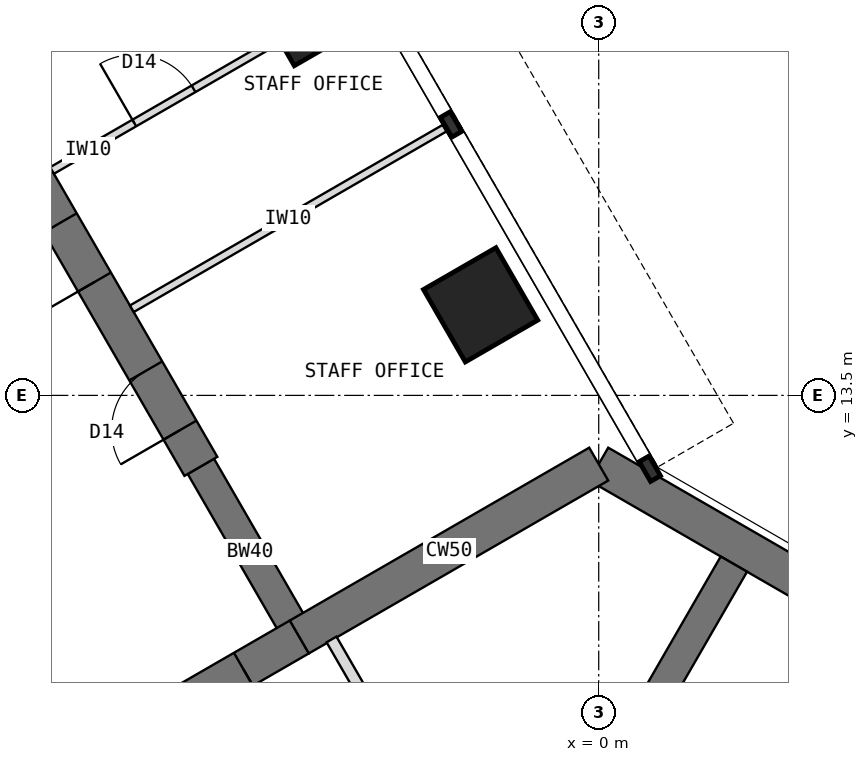
"""IFC4 building model, lengths in metres.
Left out: names, types, materials, properties, quantities, classifications, styles, units other than length and angle.
Written with IfcOpenShell. Run it as: python <this file> out.ifc"""

import sys

from ifc_helpers import new_model, si_unit, direction, frame, frame_2d, origin, origin_2d, place, context, subcontext, project, spatial, rectangle, extrude, element, fill, save


model = new_model("IFC4")
c1 = context("Model", 3, precision=1e-05, world=origin(), true_north=direction((0.0, 1.0)))
c2 = subcontext(c1, "Body", "Model", "MODEL_VIEW")
j1 = project(units=[si_unit("LENGTHUNIT", "METRE"), si_unit("PLANEANGLEUNIT", "RADIAN")], contexts=[c1])
p1 = place(None, origin())
s1 = spatial("IfcSite", under=j1, at=p1, CompositionType="ELEMENT")
p2 = place(p1, origin())
s2 = spatial("IfcBuilding", under=s1, at=p2, CompositionType="ELEMENT")
p3 = place(p2, frame((0.0, 0.0, 234.5)))
s3 = spatial("IfcBuildingStorey", under=s2, at=p3, CompositionType="ELEMENT", Elevation=234.5)
p4 = place(p3, frame((10.908, 6.298, 0.0), z_axis=(0.0, 0.0, 1.0), x_axis=(-0.866021940709, 0.500005998175, 0.0)))
e1 = element("IfcWall", 1, at=p4, inside=s3, PredefinedType="SHEAR", context=c2, shape_type="SweptSolid", body=[
    extrude(rectangle(XDim=12.596, YDim=0.5, at=frame_2d((6.298, 0.0))), origin(), (0.0, 0.0, 1.0), 4.0),
])
p5 = place(p3, frame((0.0, 12.596, 0.0), z_axis=(0.0, 0.0, 1.0), x_axis=(-0.866011268655, -0.500024481964, 0.0)))
e2 = element("IfcWall", 2, at=p5, inside=s3, PredefinedType="SHEAR", context=c2, shape_type="SweptSolid", body=[
    extrude(rectangle(XDim=4.548, YDim=0.5, at=frame_2d((2.274, 0.0))), origin(), (0.0, 0.0, 1.0), 4.0),
])
p6 = place(p3, frame((-3.939, 10.322, 0.0), z_axis=(0.0, 0.0, 1.0), x_axis=(-0.866019471182, -0.500010275428, 0.0)))
e3 = element("IfcWall", 3, at=p6, inside=s3, PredefinedType="SHEAR", context=c2, shape_type="SweptSolid", body=[
    extrude(rectangle(XDim=3.5, YDim=0.5, at=frame_2d((1.75, 0.0))), origin(), (0.0, 0.0, 1.0), 4.0),
])
p7 = place(p6, frame((0.85, 0.0, 0.0)))
e4 = element("IfcOpeningElement", 4, at=p7, cuts=e3, PredefinedType="OPENING", context=c2, shape_type="SweptSolid", body=[
    extrude(rectangle(XDim=1.8, YDim=2.1, at=frame_2d((0.9, 1.05))), frame((0.0, 0.26, 0.0), z_axis=(0.0, -1.0, 0.0), x_axis=(1.0, 0.0, 0.0)), (0.0, 0.0, 1.0), 0.52),
])
for number, where, z_axis, x_axis in (
    (5, (-6.97, 8.572, 0.0), (0.0, 0.0, 1.0), (-0.5, 0.866, 0.0)),
    (6, (-3.939, 10.322, 0.0), (0.0, 0.0, 1.0), (-0.5, 0.866, 0.0)),
):
    element("IfcWall", number, at=place(p3, frame(where, z_axis=z_axis, x_axis=x_axis)), inside=s3, PredefinedType="SHEAR", context=c2, shape_type="SweptSolid", body=[
        extrude(rectangle(XDim=2.592, YDim=0.4, at=frame_2d((1.296, 0.0))), origin(), (0.0, 0.0, 1.0), 4.0),
    ])
p8 = place(p3, frame((-5.234, 12.566, 0.0), z_axis=(0.0, 0.0, 1.0), x_axis=(-0.500010103361, 0.866019570528, 0.0)))
e7 = element("IfcWall", 7, at=p8, inside=s3, PredefinedType="SHEAR", context=c2, shape_type="SweptSolid", body=[
    extrude(rectangle(XDim=13.2, YDim=0.5, at=frame_2d((6.6, 0.0))), origin(), (0.0, 0.0, 1.0), 4.0),
])
p9 = place(p8, frame((0.55, 0.0, 0.0)))
e8 = element("IfcOpeningElement", 8, at=p9, cuts=e7, PredefinedType="OPENING", context=c2, shape_type="SweptSolid", body=[
    extrude(rectangle(XDim=0.9, YDim=2.1, at=frame_2d((0.45, 1.05))), frame((0.0, 0.26, 0.0), z_axis=(0.0, -1.0, 0.0), x_axis=(1.0, 0.0, 0.0)), (0.0, 0.0, 1.0), 0.52),
])
p10 = place(p8, frame((2.8, 0.0, 0.0)))
e9 = element("IfcOpeningElement", 9, at=p10, cuts=e7, PredefinedType="OPENING", context=c2, shape_type="SweptSolid", body=[
    extrude(rectangle(XDim=0.9, YDim=2.1, at=frame_2d((0.45, 1.05))), frame((0.0, 0.26, 0.0), z_axis=(0.0, -1.0, 0.0), x_axis=(1.0, 0.0, 0.0)), (0.0, 0.0, 1.0), 0.52),
])
p11 = place(p8, frame((7.3, 0.0, 0.0)))
e10 = element("IfcOpeningElement", 10, at=p11, cuts=e7, PredefinedType="OPENING", context=c2, shape_type="SweptSolid", body=[
    extrude(rectangle(XDim=0.9, YDim=2.1, at=frame_2d((0.45, 1.05))), frame((0.0, 0.26, 0.0), z_axis=(0.0, -1.0, 0.0), x_axis=(1.0, 0.0, 0.0)), (0.0, 0.0, 1.0), 0.52),
])
for number, where, z_axis, x_axis in (
    (11, (-1.554, 14.691, 0.0), (0.0, 0.0, 1.0), (0.866, 0.5, 0.0)),
    (12, (-3.804, 18.588, 0.0), (0.0, 0.0, 1.0), (0.866, 0.5, 0.0)),
):
    element("IfcColumn", number, at=place(p3, frame(where, z_axis=z_axis, x_axis=x_axis)), inside=s3, PredefinedType="COLUMN", context=c2, shape_type="SweptSolid", body=[
        extrude(rectangle(XDim=1.1, YDim=1.1, at=origin_2d()), origin(), (0.0, 0.0, 1.0), 4.0),
    ])
p12 = place(p3, frame((-1.201, 6.12, 0.0), z_axis=(0.0, 0.0, 1.0), x_axis=(0.500021575205, 0.866012946976, 0.0)))
e13 = element("IfcWall", 13, at=p12, inside=s3, PredefinedType="SHEAR", context=c2, shape_type="SweptSolid", body=[
    extrude(rectangle(XDim=5.958, YDim=0.4, at=frame_2d((2.979, 0.0))), origin(), (0.0, 0.0, 1.0), 4.0),
])
p13 = place(p3, frame((-6.143, 14.64, 0.0), z_axis=(0.0, 0.0, 1.0), x_axis=(0.866033238375, 0.499986429846, 0.0)))
e14 = element("IfcWall", 14, at=p13, inside=s3, PredefinedType="PARTITIONING", context=c2, shape_type="SweptSolid", body=[
    extrude(rectangle(XDim=4.75, YDim=0.1, at=frame_2d((2.375, 0.0))), origin(), (0.0, 0.0, 1.0), 3.7),
])
p14 = place(p3, frame((-7.193, 16.458, 0.0), z_axis=(0.0, 0.0, 1.0), x_axis=(0.866020560687, 0.500008388397, 0.0)))
e15 = element("IfcWall", 15, at=p14, inside=s3, PredefinedType="PARTITIONING", context=c2, shape_type="SweptSolid", body=[
    extrude(rectangle(XDim=3.4, YDim=0.1, at=frame_2d((1.7, 0.0))), origin(), (0.0, 0.0, 1.0), 3.7),
])
p15 = place(p14, frame((1.25, 0.0, 0.0)))
e16 = element("IfcOpeningElement", 16, at=p15, cuts=e15, PredefinedType="OPENING", context=c2, shape_type="SweptSolid", body=[
    extrude(rectangle(XDim=0.9, YDim=2.1, at=frame_2d((0.45, 1.05))), frame((0.0, 0.06, 0.0), z_axis=(0.0, -1.0, 0.0), x_axis=(1.0, 0.0, 0.0)), (0.0, 0.0, 1.0), 0.12),
])
p16 = place(p3, frame((-3.515, 10.289, 0.0), z_axis=(0.0, 0.0, 1.0), x_axis=(0.499968392031, -0.866043651885, 0.0)))
e17 = element("IfcWall", 17, at=p16, inside=s3, PredefinedType="PARTITIONING", context=c2, shape_type="SweptSolid", body=[
    extrude(rectangle(XDim=4.526, YDim=0.15, at=frame_2d((2.263, 0.0))), origin(), (0.0, 0.0, 1.0), 3.7),
])
p17 = place(p16, frame((2.668, 0.0, 0.0)))
e18 = element("IfcOpeningElement", 18, at=p17, cuts=e17, PredefinedType="OPENING", context=c2, shape_type="SweptSolid", body=[
    extrude(rectangle(XDim=1.0, YDim=2.1, at=frame_2d((0.5, 1.05))), frame((0.0, 0.085, 0.0), z_axis=(0.0, -1.0, 0.0), x_axis=(1.0, 0.0, 0.0)), (0.0, 0.0, 1.0), 0.17),
])
p18 = place(p7, origin())
e19 = element("IfcDoor", 19, at=p18, inside=s3, OperationType="DOUBLE_DOOR_DOUBLE_SWING", PredefinedType="DOOR", context=c2, shape_type="SweptSolid", body=[
    extrude(rectangle(XDim=1.8, YDim=2.1, at=frame_2d((0.9, 1.05))), frame((0.0, 0.025, 0.0), z_axis=(0.0, -1.0, 0.0), x_axis=(1.0, 0.0, 0.0)), (0.0, 0.0, 1.0), 0.05),
])
fill(e4, e19)
p19 = place(p15, origin())
e20 = element("IfcDoor", 20, at=p19, inside=s3, OperationType="SINGLE_SWING_LEFT", PredefinedType="DOOR", context=c2, shape_type="SweptSolid", body=[
    extrude(rectangle(XDim=0.9, YDim=2.1, at=frame_2d((0.45, 1.05))), frame((0.0, 0.025, 0.0), z_axis=(0.0, -1.0, 0.0), x_axis=(1.0, 0.0, 0.0)), (0.0, 0.0, 1.0), 0.05),
])
fill(e16, e20)
p20 = place(p9, origin())
e21 = element("IfcDoor", 21, at=p20, inside=s3, OperationType="SINGLE_SWING_LEFT", PredefinedType="DOOR", context=c2, shape_type="SweptSolid", body=[
    extrude(rectangle(XDim=0.9, YDim=2.1, at=frame_2d((0.45, 1.05))), frame((0.0, 0.025, 0.0), z_axis=(0.0, -1.0, 0.0), x_axis=(1.0, 0.0, 0.0)), (0.0, 0.0, 1.0), 0.05),
])
fill(e8, e21)
p21 = place(p10, origin())
e22 = element("IfcDoor", 22, at=p21, inside=s3, OperationType="SINGLE_SWING_LEFT", PredefinedType="DOOR", context=c2, shape_type="SweptSolid", body=[
    extrude(rectangle(XDim=0.9, YDim=2.1, at=frame_2d((0.45, 1.05))), frame((0.0, 0.025, 0.0), z_axis=(0.0, -1.0, 0.0), x_axis=(1.0, 0.0, 0.0)), (0.0, 0.0, 1.0), 0.05),
])
fill(e9, e22)
save(model, sys.argv[1])
